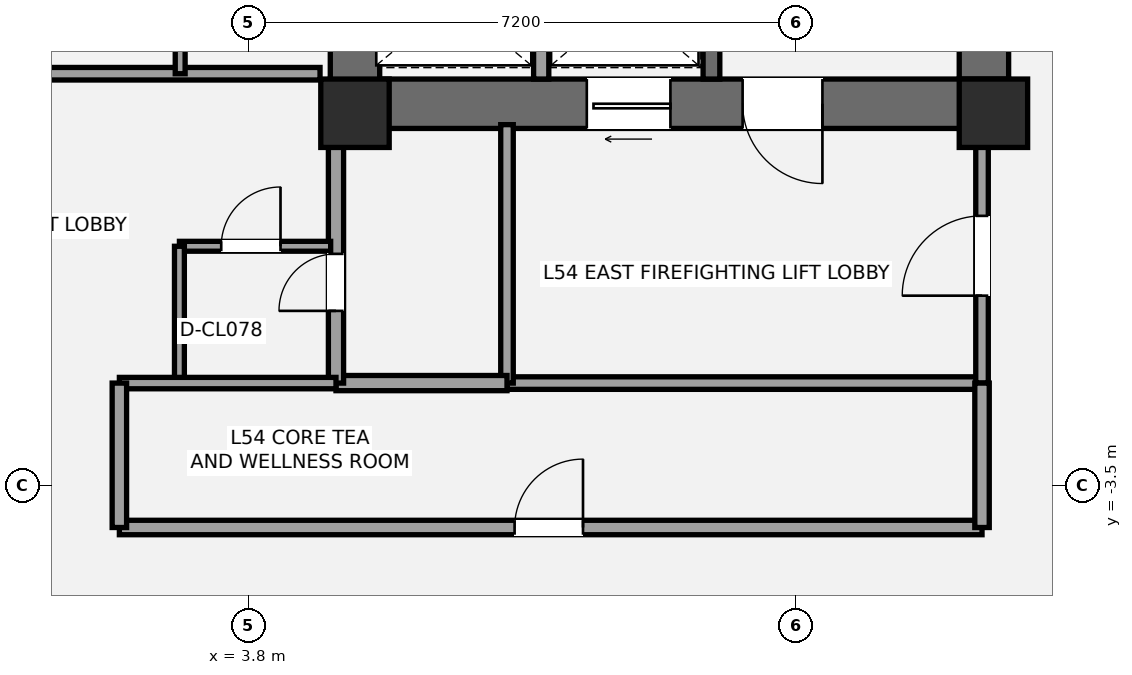
"""IFC4 building model, lengths in metres.
Left out: names, types, materials, properties, quantities, classifications, styles, units other than length and angle.
Written with IfcOpenShell. Run it as: python <this file> out.ifc"""

import sys

from ifc_helpers import new_model, si_unit, direction, frame, frame_2d, origin, origin_2d, place, context, subcontext, project, spatial, rectangle, extrude, element, fill, save


model = new_model("IFC4")
c1 = context("Model", 3, precision=1e-05, world=origin(), true_north=direction((0.0, 1.0)))
c2 = subcontext(c1, "Body", "Model", "MODEL_VIEW")
j1 = project(units=[si_unit("LENGTHUNIT", "METRE"), si_unit("PLANEANGLEUNIT", "RADIAN")], contexts=[c1])
p1 = place(None, origin())
s1 = spatial("IfcSite", under=j1, at=p1, CompositionType="ELEMENT")
p2 = place(p1, origin())
s2 = spatial("IfcBuilding", under=s1, at=p2, CompositionType="ELEMENT")
p3 = place(p2, frame((0.0, 0.0, 195.0)))
s3 = spatial("IfcBuildingStorey", under=s2, at=p3, CompositionType="ELEMENT", Elevation=195.0)
p4 = place(p3, frame((13.475, 1.2, 0.0), z_axis=(0.0, 0.0, 1.0), x_axis=(0.0, 1.0, 0.0)))
e1 = element("IfcWall", 1, at=p4, inside=s3, PredefinedType="SHEAR", context=c2, shape_type="SweptSolid", body=[
    extrude(rectangle(XDim=8.45, YDim=0.65, at=frame_2d((4.225, 0.0))), origin(), (0.0, 0.0, 1.0), 3.2),
])
p5 = place(p3, frame((13.8, 1.525, 0.0), z_axis=(0.0, 0.0, 1.0), x_axis=(-1.0, 0.0, 0.0)))
e2 = element("IfcWall", 2, at=p5, inside=s3, PredefinedType="SHEAR", context=c2, shape_type="SweptSolid", body=[
    extrude(rectangle(XDim=8.925, YDim=0.65, at=frame_2d((4.462, 0.0))), origin(), (0.0, 0.0, 1.0), 3.2),
])
p6 = place(p5, frame((2.45, 0.0, 0.0)))
e3 = element("IfcOpeningElement", 3, at=p6, cuts=e2, PredefinedType="OPENING", context=c2, shape_type="SweptSolid", body=[
    extrude(rectangle(XDim=1.05, YDim=2.15, at=frame_2d((0.525, 1.075))), frame((0.0, 0.335, 0.0), z_axis=(0.0, -1.0, 0.0), x_axis=(1.0, 0.0, 0.0)), (0.0, 0.0, 1.0), 0.67),
])
p7 = place(p5, frame((4.45, 0.0, 0.0)))
e4 = element("IfcOpeningElement", 4, at=p7, cuts=e2, PredefinedType="OPENING", context=c2, shape_type="SweptSolid", body=[
    extrude(rectangle(XDim=1.1, YDim=2.2, at=frame_2d((0.55, 1.1))), frame((0.0, 0.335, 0.0), z_axis=(0.0, -1.0, 0.0), x_axis=(1.0, 0.0, 0.0)), (0.0, 0.0, 1.0), 0.67),
])
p8 = place(p3, frame((5.2, 1.2, 0.0), z_axis=(0.0, 0.0, 1.0), x_axis=(0.0, 1.0, 0.0)))
e5 = element("IfcWall", 5, at=p8, inside=s3, PredefinedType="SHEAR", context=c2, shape_type="SweptSolid", body=[
    extrude(rectangle(XDim=2.6, YDim=0.65, at=frame_2d((1.3, 0.0))), origin(), (0.0, 0.0, 1.0), 3.2),
])
p9 = place(p3, frame((9.89, 1.85, 0.0), z_axis=(0.0, 0.0, 1.0), x_axis=(0.0, 1.0, 0.0)))
e6 = element("IfcWall", 6, at=p9, inside=s3, PredefinedType="SHEAR", context=c2, shape_type="SweptSolid", body=[
    extrude(rectangle(XDim=7.15, YDim=0.22, at=frame_2d((3.575, 0.0))), origin(), (0.0, 0.0, 1.0), 3.2),
])
for number, where, z_axis, x_axis in (
    (7, (5.2, 1.4, 0.0), (0.0, 0.0, 1.0), (1.0, 0.0, 0.0)),
    (8, (13.6, 1.4, 0.0), (0.0, 0.0, 1.0), (1.0, 0.0, 0.0)),
):
    element("IfcColumn", number, at=place(p3, frame(where, z_axis=z_axis, x_axis=x_axis)), inside=s3, PredefinedType="COLUMN", context=c2, shape_type="SweptSolid", body=[
        extrude(rectangle(XDim=0.9, YDim=0.9, at=origin_2d()), origin(), (0.0, 0.0, 1.0), 3.2),
    ])
p10 = place(p3, frame((7.2, -2.15, 0.0), z_axis=(0.0, 0.0, 1.0), x_axis=(1.0, 0.0, 0.0)))
e9 = element("IfcWall", 9, at=p10, inside=s3, PredefinedType="PARTITIONING", context=c2, shape_type="SweptSolid", body=[
    extrude(rectangle(XDim=6.25, YDim=0.165, at=frame_2d((3.125, 0.0))), origin(), (0.0, 0.0, 1.0), 3.02),
])
p11 = place(p3, frame((7.2, -2.15, 0.0), z_axis=(0.0, 0.0, 1.0), x_axis=(0.0, 1.0, 0.0)))
e10 = element("IfcWall", 10, at=p11, inside=s3, PredefinedType="PARTITIONING", context=c2, shape_type="SweptSolid", body=[
    extrude(rectangle(XDim=3.4, YDim=0.165, at=frame_2d((1.7, 0.0))), origin(), (0.0, 0.0, 1.0), 2.473),
])
p12 = place(p3, frame((13.45, -2.15, 0.0), z_axis=(0.0, 0.0, 1.0), x_axis=(0.0, 1.0, 0.0)))
e11 = element("IfcWall", 11, at=p12, inside=s3, PredefinedType="PARTITIONING", context=c2, shape_type="SweptSolid", body=[
    extrude(rectangle(XDim=3.4, YDim=0.165, at=frame_2d((1.7, 0.0))), origin(), (0.0, 0.0, 1.0), 2.473),
])
p13 = place(p12, frame((1.15, 0.0, 0.0)))
e12 = element("IfcOpeningElement", 12, at=p13, cuts=e11, PredefinedType="OPENING", context=c2, shape_type="SweptSolid", body=[
    extrude(rectangle(XDim=1.05, YDim=2.15, at=frame_2d((0.525, 1.075))), frame((0.0, 0.093, 0.0), z_axis=(0.0, -1.0, 0.0), x_axis=(1.0, 0.0, 0.0)), (0.0, 0.0, 1.0), 0.185),
])
p14 = place(p3, frame((4.95, -2.15, 0.0), z_axis=(0.0, 0.0, 1.0), x_axis=(1.0, 0.0, 0.0)))
e13 = element("IfcWall", 13, at=p14, inside=s3, PredefinedType="SOLIDWALL", context=c2, shape_type="SweptSolid", body=[
    extrude(rectangle(XDim=2.25, YDim=0.2, at=frame_2d((1.125, 0.0))), origin(), (0.0, 0.0, 1.0), 3.02),
])
p15 = place(p3, frame((4.95, -2.15, 0.0), z_axis=(0.0, 0.0, 1.0), x_axis=(0.0, 1.0, 0.0)))
e14 = element("IfcWall", 14, at=p15, inside=s3, PredefinedType="SOLIDWALL", context=c2, shape_type="SweptSolid", body=[
    extrude(rectangle(XDim=3.4, YDim=0.2, at=frame_2d((1.7, 0.0))), origin(), (0.0, 0.0, 1.0), 2.473),
])
p16 = place(p15, frame((0.95, 0.0, 0.0)))
e15 = element("IfcOpeningElement", 15, at=p16, cuts=e14, PredefinedType="OPENING", context=c2, shape_type="SweptSolid", body=[
    extrude(rectangle(XDim=0.75, YDim=2.1, at=frame_2d((0.375, 1.05))), frame((0.0, 0.11, 0.0), z_axis=(0.0, -1.0, 0.0), x_axis=(1.0, 0.0, 0.0)), (0.0, 0.0, 1.0), 0.22),
])
p17 = place(p3, frame((2.89, -0.35, 0.0), z_axis=(0.0, 0.0, 1.0), x_axis=(1.0, 0.0, 0.0)))
e16 = element("IfcWall", 16, at=p17, inside=s3, PredefinedType="PARTITIONING", context=c2, shape_type="SweptSolid", body=[
    extrude(rectangle(XDim=1.99, YDim=0.13, at=frame_2d((0.995, 0.0))), origin(), (0.0, 0.0, 1.0), 3.02),
])
p18 = place(p17, frame((0.55, 0.0, 0.0)))
e17 = element("IfcOpeningElement", 17, at=p18, cuts=e16, PredefinedType="OPENING", context=c2, shape_type="SweptSolid", body=[
    extrude(rectangle(XDim=0.78, YDim=2.1, at=frame_2d((0.39, 1.05))), frame((0.0, 0.075, 0.0), z_axis=(0.0, -1.0, 0.0), x_axis=(1.0, 0.0, 0.0)), (0.0, 0.0, 1.0), 0.15),
])
p19 = place(p3, frame((2.89, -2.15, 0.0), z_axis=(0.0, 0.0, 1.0), x_axis=(0.0, 1.0, 0.0)))
e18 = element("IfcWall", 18, at=p19, inside=s3, PredefinedType="PARTITIONING", context=c2, shape_type="SweptSolid", body=[
    extrude(rectangle(XDim=1.8, YDim=0.13, at=frame_2d((0.9, 0.0))), origin(), (0.0, 0.0, 1.0), 3.02),
])
p20 = place(p3, frame((7.65, 1.85, 0.0), z_axis=(0.0, 0.0, 1.0), x_axis=(0.0, 1.0, 0.0)))
e19 = element("IfcWall", 19, at=p20, inside=s3, PredefinedType="SOLIDWALL", context=c2, shape_type="SweptSolid", body=[
    extrude(rectangle(XDim=1.97, YDim=0.2, at=frame_2d((0.985, 0.0))), origin(), (0.0, 0.0, 1.0), 3.02),
])
p21 = place(p3, frame((0.85, 1.92, 0.0), z_axis=(0.0, 0.0, 1.0), x_axis=(1.0, 0.0, 0.0)))
e20 = element("IfcWall", 20, at=p21, inside=s3, PredefinedType="PARTITIONING", context=c2, shape_type="SweptSolid", body=[
    extrude(rectangle(XDim=3.89, YDim=0.165, at=frame_2d((1.945, 0.0))), origin(), (0.0, 0.0, 1.0), 2.16),
])
p22 = place(p3, frame((2.9, 1.92, 0.0), z_axis=(0.0, 0.0, 1.0), x_axis=(0.0, 1.0, 0.0)))
e21 = element("IfcWall", 21, at=p22, inside=s3, PredefinedType="PARTITIONING", context=c2, shape_type="SweptSolid", body=[
    extrude(rectangle(XDim=1.82, YDim=0.13, at=frame_2d((0.91, 0.0))), origin(), (0.0, 0.0, 1.0), 3.02),
])
p23 = place(p3, frame((2.1, -4.05, 0.0), z_axis=(0.0, 0.0, 1.0), x_axis=(1.0, 0.0, 0.0)))
e22 = element("IfcWall", 22, at=p23, inside=s3, PredefinedType="PLUMBINGWALL", context=c2, shape_type="SweptSolid", body=[
    extrude(rectangle(XDim=11.35, YDim=0.19, at=frame_2d((5.675, 0.0))), origin(), (0.0, 0.0, 1.0), 3.02),
])
p24 = place(p23, frame((5.2, 0.0, 0.0)))
e23 = element("IfcOpeningElement", 23, at=p24, cuts=e22, PredefinedType="OPENING", context=c2, shape_type="SweptSolid", body=[
    extrude(rectangle(XDim=0.9, YDim=2.1, at=frame_2d((0.45, 1.05))), frame((0.0, 0.105, 0.0), z_axis=(0.0, -1.0, 0.0), x_axis=(1.0, 0.0, 0.0)), (0.0, 0.0, 1.0), 0.21),
])
p25 = place(p3, frame((2.1, -2.15, 0.0), z_axis=(0.0, 0.0, 1.0), x_axis=(1.0, 0.0, 0.0)))
e24 = element("IfcWall", 24, at=p25, inside=s3, PredefinedType="PLUMBINGWALL", context=c2, shape_type="SweptSolid", body=[
    extrude(rectangle(XDim=2.85, YDim=0.15, at=frame_2d((1.425, 0.0))), origin(), (0.0, 0.0, 1.0), 3.02),
])
p26 = place(p3, frame((2.1, -4.05, 0.0), z_axis=(0.0, 0.0, 1.0), x_axis=(0.0, 1.0, 0.0)))
e25 = element("IfcWall", 25, at=p26, inside=s3, PredefinedType="PLUMBINGWALL", context=c2, shape_type="SweptSolid", body=[
    extrude(rectangle(XDim=1.9, YDim=0.19, at=frame_2d((0.95, 0.0))), origin(), (0.0, 0.0, 1.0), 3.02),
])
p27 = place(p3, frame((13.45, -4.05, 0.0), z_axis=(0.0, 0.0, 1.0), x_axis=(0.0, 1.0, 0.0)))
e26 = element("IfcWall", 26, at=p27, inside=s3, PredefinedType="PLUMBINGWALL", context=c2, shape_type="SweptSolid", body=[
    extrude(rectangle(XDim=1.9, YDim=0.19, at=frame_2d((0.95, 0.0))), origin(), (0.0, 0.0, 1.0), 2.473),
])
p28 = place(p6, origin())
e27 = element("IfcDoor", 27, at=p28, inside=s3, OperationType="SINGLE_SWING_LEFT", PredefinedType="DOOR", context=c2, shape_type="SweptSolid", body=[
    extrude(rectangle(XDim=1.05, YDim=2.15, at=frame_2d((0.525, 1.075))), frame((0.0, 0.025, 0.0), z_axis=(0.0, -1.0, 0.0), x_axis=(1.0, 0.0, 0.0)), (0.0, 0.0, 1.0), 0.05),
])
fill(e3, e27)
p29 = place(p13, origin())
e28 = element("IfcDoor", 28, at=p29, inside=s3, OperationType="SINGLE_SWING_LEFT", PredefinedType="DOOR", context=c2, shape_type="SweptSolid", body=[
    extrude(rectangle(XDim=1.05, YDim=2.15, at=frame_2d((0.525, 1.075))), frame((0.0, 0.025, 0.0), z_axis=(0.0, -1.0, 0.0), x_axis=(1.0, 0.0, 0.0)), (0.0, 0.0, 1.0), 0.05),
])
fill(e12, e28)
p30 = place(p16, origin())
e29 = element("IfcDoor", 29, at=p30, inside=s3, OperationType="SINGLE_SWING_LEFT", PredefinedType="DOOR", context=c2, shape_type="SweptSolid", body=[
    extrude(rectangle(XDim=0.75, YDim=2.1, at=frame_2d((0.375, 1.05))), frame((0.0, 0.025, 0.0), z_axis=(0.0, -1.0, 0.0), x_axis=(1.0, 0.0, 0.0)), (0.0, 0.0, 1.0), 0.05),
])
fill(e15, e29)
p31 = place(p18, origin())
e30 = element("IfcDoor", 30, at=p31, inside=s3, OperationType="SINGLE_SWING_RIGHT", PredefinedType="DOOR", context=c2, shape_type="SweptSolid", body=[
    extrude(rectangle(XDim=0.78, YDim=2.1, at=frame_2d((0.39, 1.05))), frame((0.0, 0.025, 0.0), z_axis=(0.0, -1.0, 0.0), x_axis=(1.0, 0.0, 0.0)), (0.0, 0.0, 1.0), 0.05),
])
fill(e17, e30)
p32 = place(p7, origin())
e31 = element("IfcDoor", 31, at=p32, inside=s3, OperationType="SLIDING_TO_LEFT", PredefinedType="DOOR", context=c2, shape_type="SweptSolid", body=[
    extrude(rectangle(XDim=1.1, YDim=2.2, at=frame_2d((0.55, 1.1))), frame((0.0, 0.025, 0.0), z_axis=(0.0, -1.0, 0.0), x_axis=(1.0, 0.0, 0.0)), (0.0, 0.0, 1.0), 0.05),
])
fill(e4, e31)
p33 = place(p24, origin())
e32 = element("IfcDoor", 32, at=p33, inside=s3, OperationType="SINGLE_SWING_RIGHT", PredefinedType="DOOR", context=c2, shape_type="SweptSolid", body=[
    extrude(rectangle(XDim=0.9, YDim=2.1, at=frame_2d((0.45, 1.05))), frame((0.0, 0.025, 0.0), z_axis=(0.0, -1.0, 0.0), x_axis=(1.0, 0.0, 0.0)), (0.0, 0.0, 1.0), 0.05),
])
fill(e23, e32)
save(model, sys.argv[1])
